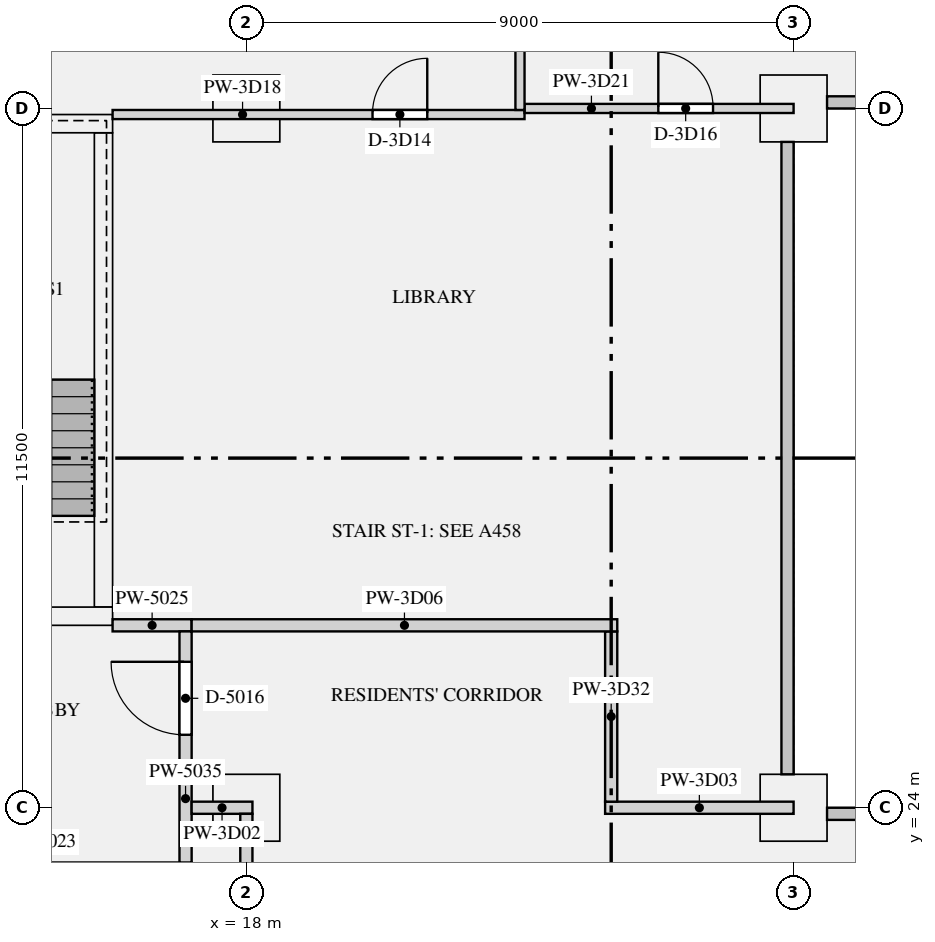
"""IFC4 building model, lengths in metres.
Left out: names, types, materials, properties, quantities, classifications, styles, units other than length and angle.
Written with IfcOpenShell. Run it as: python <this file> out.ifc"""

import sys

from ifc_helpers import new_model, si_unit, direction, frame, frame_2d, origin, origin_2d, place, context, subcontext, project, spatial, rectangle, extrude, element, fill, save


model = new_model("IFC4")
c1 = context("Model", 3, precision=1e-05, world=origin(), true_north=direction((0.0, 1.0)))
c2 = subcontext(c1, "Body", "Model", "MODEL_VIEW")
j1 = project(units=[si_unit("LENGTHUNIT", "METRE"), si_unit("PLANEANGLEUNIT", "RADIAN")], contexts=[c1])
p1 = place(None, origin())
s1 = spatial("IfcSite", under=j1, at=p1, CompositionType="ELEMENT")
p2 = place(p1, origin())
s2 = spatial("IfcBuilding", under=s1, at=p2, CompositionType="ELEMENT")
p3 = place(p2, frame((0.0, 0.0, 166.5)))
s3 = spatial("IfcBuildingStorey", under=s2, at=p3, CompositionType="ELEMENT", Elevation=166.5)
for number, where, z_axis, x_axis in (
    (1, (18.0, 24.0, 0.0), (0.0, 0.0, 1.0), (1.0, 0.0, 0.0)),
    (2, (27.0, 24.0, 0.0), (0.0, 0.0, 1.0), (1.0, 0.0, 0.0)),
    (3, (18.0, 35.5, 0.0), (0.0, 0.0, 1.0), (1.0, 0.0, 0.0)),
    (4, (27.0, 35.5, 0.0), (0.0, 0.0, 1.0), (1.0, 0.0, 0.0)),
):
    element("IfcColumn", number, at=place(p3, frame(where, z_axis=z_axis, x_axis=x_axis)), inside=s3, PredefinedType="COLUMN", context=c2, shape_type="SweptSolid", body=[
        extrude(rectangle(XDim=1.1, YDim=1.1, at=origin_2d()), origin(), (0.0, 0.0, 1.0), 3.15),
    ])
p4 = place(p3, frame((12.2, 27.15, 0.0), z_axis=(0.0, 0.0, 1.0), x_axis=(1.0, 0.0, 0.0)))
e5 = element("IfcWall", 5, at=p4, inside=s3, PredefinedType="SHEAR", context=c2, shape_type="SweptSolid", body=[
    extrude(rectangle(XDim=3.6, YDim=0.3, at=frame_2d((1.8, 0.0))), origin(), (0.0, 0.0, 1.0), 3.15),
])
p5 = place(p4, frame((1.25, 0.0, 0.0)))
e6 = element("IfcOpeningElement", 6, at=p5, cuts=e5, PredefinedType="OPENING", context=c2, shape_type="SweptSolid", body=[
    extrude(rectangle(XDim=1.1, YDim=2.1, at=frame_2d((0.55, 1.05))), frame((0.0, 0.16, 0.0), z_axis=(0.0, -1.0, 0.0), x_axis=(1.0, 0.0, 0.0)), (0.0, 0.0, 1.0), 0.32),
])
p6 = place(p3, frame((12.2, 35.25, 0.0), z_axis=(0.0, 0.0, 1.0), x_axis=(1.0, 0.0, 0.0)))
e7 = element("IfcWall", 7, at=p6, inside=s3, PredefinedType="SHEAR", context=c2, shape_type="SweptSolid", body=[
    extrude(rectangle(XDim=3.6, YDim=0.3, at=frame_2d((1.8, 0.0))), origin(), (0.0, 0.0, 1.0), 3.15),
])
p7 = place(p3, frame((15.65, 27.3, 0.0), z_axis=(0.0, 0.0, 1.0), x_axis=(0.0, 1.0, 0.0)))
e8 = element("IfcWall", 8, at=p7, inside=s3, PredefinedType="SHEAR", context=c2, shape_type="SweptSolid", body=[
    extrude(rectangle(XDim=7.8, YDim=0.3, at=frame_2d((3.9, 0.0))), origin(), (0.0, 0.0, 1.0), 3.15),
])
p8 = place(p3, frame((15.8, 27.0, 0.0), z_axis=(0.0, 0.0, 1.0), x_axis=(1.0, 0.0, 0.0)))
e9 = element("IfcWall", 9, at=p8, inside=s3, PredefinedType="PARTITIONING", context=c2, shape_type="SweptSolid", body=[
    extrude(rectangle(XDim=1.3, YDim=0.2, at=frame_2d((0.65, 0.0))), origin(), (0.0, 0.0, 1.0), 2.83),
])
p9 = place(p3, frame((17.0, 23.1, 0.0), z_axis=(0.0, 0.0, 1.0), x_axis=(0.0, 1.0, 0.0)))
e10 = element("IfcWall", 10, at=p9, inside=s3, PredefinedType="PARTITIONING", context=c2, shape_type="SweptSolid", body=[
    extrude(rectangle(XDim=3.8, YDim=0.2, at=frame_2d((1.9, 0.0))), origin(), (0.0, 0.0, 1.0), 2.83),
])
p10 = place(p9, frame((2.1, 0.0, 0.0)))
e11 = element("IfcOpeningElement", 11, at=p10, cuts=e10, PredefinedType="OPENING", context=c2, shape_type="SweptSolid", body=[
    extrude(rectangle(XDim=1.2, YDim=2.1, at=frame_2d((0.6, 1.05))), frame((0.0, 0.11, 0.0), z_axis=(0.0, -1.0, 0.0), x_axis=(1.0, 0.0, 0.0)), (0.0, 0.0, 1.0), 0.22),
])
p11 = place(p3, frame((17.1, 24.0, 0.0), z_axis=(0.0, 0.0, 1.0), x_axis=(1.0, 0.0, 0.0)))
e12 = element("IfcWall", 12, at=p11, inside=s3, PredefinedType="PARTITIONING", context=c2, shape_type="SweptSolid", body=[
    extrude(rectangle(XDim=1.0, YDim=0.2, at=frame_2d((0.5, 0.0))), origin(), (0.0, 0.0, 1.0), 2.83),
])
p12 = place(p3, frame((23.9, 24.0, 0.0), z_axis=(0.0, 0.0, 1.0), x_axis=(1.0, 0.0, 0.0)))
e13 = element("IfcWall", 13, at=p12, inside=s3, PredefinedType="PARTITIONING", context=c2, shape_type="SweptSolid", body=[
    extrude(rectangle(XDim=3.1, YDim=0.2, at=frame_2d((1.55, 0.0))), origin(), (0.0, 0.0, 1.0), 2.83),
])
p13 = place(p3, frame((17.1, 27.0, 0.0), z_axis=(0.0, 0.0, 1.0), x_axis=(1.0, 0.0, 0.0)))
e14 = element("IfcWall", 14, at=p13, inside=s3, PredefinedType="PARTITIONING", context=c2, shape_type="SweptSolid", body=[
    extrude(rectangle(XDim=7.0, YDim=0.2, at=frame_2d((3.5, 0.0))), origin(), (0.0, 0.0, 1.0), 2.83),
])
p14 = place(p3, frame((15.8, 35.4, 0.0), z_axis=(0.0, 0.0, 1.0), x_axis=(1.0, 0.0, 0.0)))
e15 = element("IfcWall", 15, at=p14, inside=s3, PredefinedType="PARTITIONING", context=c2, shape_type="SweptSolid", body=[
    extrude(rectangle(XDim=6.775, YDim=0.15, at=frame_2d((3.387, 0.0))), origin(), (0.0, 0.0, 1.0), 2.83),
])
p15 = place(p14, frame((4.275, 0.0, 0.0)))
e16 = element("IfcOpeningElement", 16, at=p15, cuts=e15, PredefinedType="OPENING", context=c2, shape_type="SweptSolid", body=[
    extrude(rectangle(XDim=0.9, YDim=2.1, at=frame_2d((0.45, 1.05))), frame((0.0, 0.085, 0.0), z_axis=(0.0, -1.0, 0.0), x_axis=(1.0, 0.0, 0.0)), (0.0, 0.0, 1.0), 0.17),
])
p16 = place(p3, frame((22.575, 35.5, 0.0), z_axis=(0.0, 0.0, 1.0), x_axis=(1.0, 0.0, 0.0)))
e17 = element("IfcWall", 17, at=p16, inside=s3, PredefinedType="PARTITIONING", context=c2, shape_type="SweptSolid", body=[
    extrude(rectangle(XDim=4.425, YDim=0.15, at=frame_2d((2.212, 0.0))), origin(), (0.0, 0.0, 1.0), 2.83),
])
p17 = place(p16, frame((2.2, 0.0, 0.0)))
e18 = element("IfcOpeningElement", 18, at=p17, cuts=e17, PredefinedType="OPENING", context=c2, shape_type="SweptSolid", body=[
    extrude(rectangle(XDim=0.9, YDim=2.1, at=frame_2d((0.45, 1.05))), frame((0.0, 0.085, 0.0), z_axis=(0.0, -1.0, 0.0), x_axis=(1.0, 0.0, 0.0)), (0.0, 0.0, 1.0), 0.17),
])
p18 = place(p3, frame((18.0, 16.1, 0.0), z_axis=(0.0, 0.0, 1.0), x_axis=(0.0, 1.0, 0.0)))
e19 = element("IfcWall", 19, at=p18, inside=s3, PredefinedType="PARTITIONING", context=c2, shape_type="SweptSolid", body=[
    extrude(rectangle(XDim=7.8, YDim=0.2, at=frame_2d((3.9, 0.0))), origin(), (0.0, 0.0, 1.0), 2.83),
])
p19 = place(p18, frame((1.85, 0.0, 0.0)))
e20 = element("IfcOpeningElement", 20, at=p19, cuts=e19, PredefinedType="OPENING", context=c2, shape_type="SweptSolid", body=[
    extrude(rectangle(XDim=1.1, YDim=2.1, at=frame_2d((0.55, 1.05))), frame((0.0, 0.11, 0.0), z_axis=(0.0, -1.0, 0.0), x_axis=(1.0, 0.0, 0.0)), (0.0, 0.0, 1.0), 0.22),
])
p20 = place(p3, frame((24.0, 24.1, 0.0), z_axis=(0.0, 0.0, 1.0), x_axis=(0.0, 1.0, 0.0)))
e21 = element("IfcWall", 21, at=p20, inside=s3, PredefinedType="PARTITIONING", context=c2, shape_type="SweptSolid", body=[
    extrude(rectangle(XDim=2.8, YDim=0.2, at=frame_2d((1.4, 0.0))), origin(), (0.0, 0.0, 1.0), 2.83),
])
p21 = place(p3, frame((22.5, 35.475, 0.0), z_axis=(0.0, 0.0, 1.0), x_axis=(0.0, 1.0, 0.0)))
e22 = element("IfcWall", 22, at=p21, inside=s3, PredefinedType="PARTITIONING", context=c2, shape_type="SweptSolid", body=[
    extrude(rectangle(XDim=7.325, YDim=0.15, at=frame_2d((3.663, 0.0))), origin(), (0.0, 0.0, 1.0), 2.83),
])
p22 = place(p21, frame((3.0, 0.0, 0.0)))
e23 = element("IfcOpeningElement", 23, at=p22, cuts=e22, PredefinedType="OPENING", context=c2, shape_type="SweptSolid", body=[
    extrude(rectangle(XDim=1.5, YDim=2.1, at=frame_2d((0.75, 1.05))), frame((0.0, 0.085, 0.0), z_axis=(0.0, -1.0, 0.0), x_axis=(1.0, 0.0, 0.0)), (0.0, 0.0, 1.0), 0.17),
])
p23 = place(p10, origin())
e24 = element("IfcDoor", 24, at=p23, inside=s3, OperationType="SINGLE_SWING_RIGHT", PredefinedType="DOOR", context=c2, shape_type="SweptSolid", body=[
    extrude(rectangle(XDim=1.2, YDim=2.1, at=frame_2d((0.6, 1.05))), frame((0.0, 0.025, 0.0), z_axis=(0.0, -1.0, 0.0), x_axis=(1.0, 0.0, 0.0)), (0.0, 0.0, 1.0), 0.05),
])
fill(e11, e24)
p24 = place(p15, origin())
e25 = element("IfcDoor", 25, at=p24, inside=s3, OperationType="SINGLE_SWING_RIGHT", PredefinedType="DOOR", context=c2, shape_type="SweptSolid", body=[
    extrude(rectangle(XDim=0.9, YDim=2.1, at=frame_2d((0.45, 1.05))), frame((0.0, 0.025, 0.0), z_axis=(0.0, -1.0, 0.0), x_axis=(1.0, 0.0, 0.0)), (0.0, 0.0, 1.0), 0.05),
])
fill(e16, e25)
p25 = place(p17, origin())
e26 = element("IfcDoor", 26, at=p25, inside=s3, OperationType="SINGLE_SWING_LEFT", PredefinedType="DOOR", context=c2, shape_type="SweptSolid", body=[
    extrude(rectangle(XDim=0.9, YDim=2.1, at=frame_2d((0.45, 1.05))), frame((0.0, 0.025, 0.0), z_axis=(0.0, -1.0, 0.0), x_axis=(1.0, 0.0, 0.0)), (0.0, 0.0, 1.0), 0.05),
])
fill(e18, e26)
save(model, sys.argv[1])
